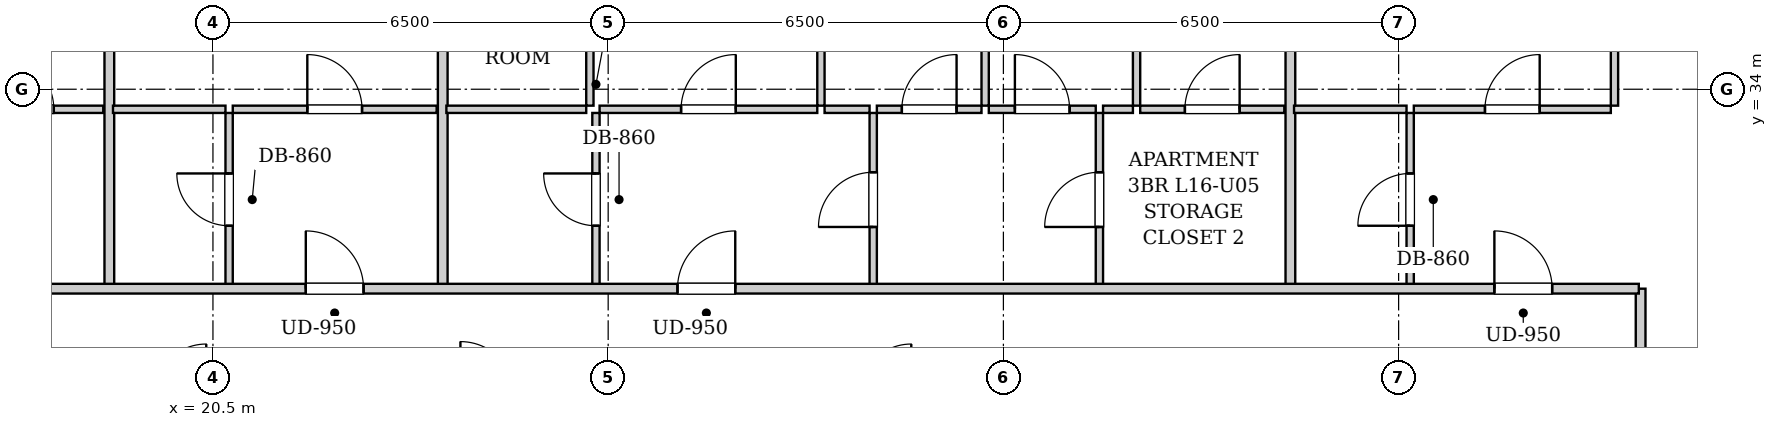
"""IFC4 building model, lengths in metres.
Left out: names, types, materials, properties, quantities, classifications, styles, units other than length and angle.
Written with IfcOpenShell. Run it as: python <this file> out.ifc"""

import sys

from ifc_helpers import new_model, si_unit, direction, frame, frame_2d, origin, place, context, subcontext, project, spatial, rectangle, extrude, element, fill, save


model = new_model("IFC4")
c1 = context("Model", 3, precision=1e-05, world=origin(), true_north=direction((0.0, 1.0)))
c2 = subcontext(c1, "Body", "Model", "MODEL_VIEW")
j1 = project(units=[si_unit("LENGTHUNIT", "METRE"), si_unit("PLANEANGLEUNIT", "RADIAN")], contexts=[c1])
p1 = place(None, origin())
s1 = spatial("IfcSite", under=j1, at=p1, CompositionType="ELEMENT")
p2 = place(p1, origin())
s2 = spatial("IfcBuilding", under=s1, at=p2, CompositionType="ELEMENT")
p3 = place(p2, frame((0.0, 0.0, 61.0)))
s3 = spatial("IfcBuildingStorey", under=s2, at=p3, CompositionType="ELEMENT", Elevation=61.0)
p4 = place(p3, frame((43.98, 28.98, 0.0), z_axis=(0.0, 0.0, 1.0), x_axis=(0.0, 1.0, 0.0)))
e1 = element("IfcWall", 1, at=p4, inside=s3, PredefinedType="PARTITIONING", context=c2, shape_type="SweptSolid", body=[
    extrude(rectangle(XDim=1.74, YDim=0.16, at=frame_2d((0.87, 0.0))), origin(), (0.0, 0.0, 1.0), 2.94),
])
p5 = place(p3, frame((16.17, 33.67, 0.0), z_axis=(0.0, 0.0, 1.0), x_axis=(1.0, 0.0, 0.0)))
e2 = element("IfcWall", 2, at=p5, inside=s3, PredefinedType="PARTITIONING", context=c2, shape_type="SweptSolid", body=[
    extrude(rectangle(XDim=2.526, YDim=0.12, at=frame_2d((1.263, 0.0))), origin(), (0.0, 0.0, 1.0), 2.94),
])
p6 = place(p5, frame((0.813, 0.0, 0.0)))
e3 = element("IfcOpeningElement", 3, at=p6, cuts=e2, PredefinedType="OPENING", context=c2, shape_type="SweptSolid", body=[
    extrude(rectangle(XDim=0.9, YDim=2.05, at=frame_2d((0.45, 1.025))), frame((0.0, 0.07, 0.0), z_axis=(0.0, -1.0, 0.0), x_axis=(1.0, 0.0, 0.0)), (0.0, 0.0, 1.0), 0.14),
])
p7 = place(p3, frame((18.796, 30.76, 0.0), z_axis=(0.0, 0.0, 1.0), x_axis=(0.0, 1.0, 0.0)))
e4 = element("IfcWall", 4, at=p7, inside=s3, PredefinedType="PARTITIONING", context=c2, shape_type="SweptSolid", body=[
    extrude(rectangle(XDim=16.56, YDim=0.16, at=frame_2d((8.28, 0.0))), origin(), (0.0, 0.0, 1.0), 2.94),
])
p8 = place(p3, frame((20.766, 30.76, 0.0), z_axis=(0.0, 0.0, 1.0), x_axis=(0.0, 1.0, 0.0)))
e5 = element("IfcWall", 5, at=p8, inside=s3, PredefinedType="PARTITIONING", context=c2, shape_type="SweptSolid", body=[
    extrude(rectangle(XDim=2.85, YDim=0.12, at=frame_2d((1.425, 0.0))), origin(), (0.0, 0.0, 1.0), 2.94),
])
p9 = place(p8, frame((0.995, 0.0, 0.0)))
e6 = element("IfcOpeningElement", 6, at=p9, cuts=e5, PredefinedType="OPENING", context=c2, shape_type="SweptSolid", body=[
    extrude(rectangle(XDim=0.86, YDim=2.05, at=frame_2d((0.43, 1.025))), frame((0.0, 0.07, 0.0), z_axis=(0.0, -1.0, 0.0), x_axis=(1.0, 0.0, 0.0)), (0.0, 0.0, 1.0), 0.14),
])
p10 = place(p3, frame((18.856, 33.67, 0.0), z_axis=(0.0, 0.0, 1.0), x_axis=(1.0, 0.0, 0.0)))
e7 = element("IfcWall", 7, at=p10, inside=s3, PredefinedType="PARTITIONING", context=c2, shape_type="SweptSolid", body=[
    extrude(rectangle(XDim=1.85, YDim=0.12, at=frame_2d((0.925, 0.0))), origin(), (0.0, 0.0, 1.0), 2.94),
])
p11 = place(p3, frame((20.826, 33.67, 0.0), z_axis=(0.0, 0.0, 1.0), x_axis=(1.0, 0.0, 0.0)))
e8 = element("IfcWall", 8, at=p11, inside=s3, PredefinedType="PARTITIONING", context=c2, shape_type="SweptSolid", body=[
    extrude(rectangle(XDim=3.353, YDim=0.12, at=frame_2d((1.677, 0.0))), origin(), (0.0, 0.0, 1.0), 2.94),
])
p12 = place(p11, frame((1.226, 0.0, 0.0)))
e9 = element("IfcOpeningElement", 9, at=p12, cuts=e8, PredefinedType="OPENING", context=c2, shape_type="SweptSolid", body=[
    extrude(rectangle(XDim=0.9, YDim=2.05, at=frame_2d((0.45, 1.025))), frame((0.0, 0.07, 0.0), z_axis=(0.0, -1.0, 0.0), x_axis=(1.0, 0.0, 0.0)), (0.0, 0.0, 1.0), 0.14),
])
p13 = place(p3, frame((24.279, 30.76, 0.0), z_axis=(0.0, 0.0, 1.0), x_axis=(0.0, 1.0, 0.0)))
e10 = element("IfcWall", 10, at=p13, inside=s3, PredefinedType="PARTITIONING", context=c2, shape_type="SweptSolid", body=[
    extrude(rectangle(XDim=16.56, YDim=0.16, at=frame_2d((8.28, 0.0))), origin(), (0.0, 0.0, 1.0), 2.94),
])
p14 = place(p3, frame((26.799, 30.76, 0.0), z_axis=(0.0, 0.0, 1.0), x_axis=(0.0, 1.0, 0.0)))
e11 = element("IfcWall", 11, at=p14, inside=s3, PredefinedType="PARTITIONING", context=c2, shape_type="SweptSolid", body=[
    extrude(rectangle(XDim=2.85, YDim=0.12, at=frame_2d((1.425, 0.0))), origin(), (0.0, 0.0, 1.0), 2.94),
])
p15 = place(p14, frame((0.995, 0.0, 0.0)))
e12 = element("IfcOpeningElement", 12, at=p15, cuts=e11, PredefinedType="OPENING", context=c2, shape_type="SweptSolid", body=[
    extrude(rectangle(XDim=0.86, YDim=2.05, at=frame_2d((0.43, 1.025))), frame((0.0, 0.07, 0.0), z_axis=(0.0, -1.0, 0.0), x_axis=(1.0, 0.0, 0.0)), (0.0, 0.0, 1.0), 0.14),
])
p16 = place(p3, frame((24.339, 33.67, 0.0), z_axis=(0.0, 0.0, 1.0), x_axis=(1.0, 0.0, 0.0)))
e13 = element("IfcWall", 13, at=p16, inside=s3, PredefinedType="PARTITIONING", context=c2, shape_type="SweptSolid", body=[
    extrude(rectangle(XDim=2.3, YDim=0.12, at=frame_2d((1.15, 0.0))), origin(), (0.0, 0.0, 1.0), 2.94),
])
p17 = place(p3, frame((31.359, 30.76, 0.0), z_axis=(0.0, 0.0, 1.0), x_axis=(0.0, 1.0, 0.0)))
e14 = element("IfcWall", 14, at=p17, inside=s3, PredefinedType="PARTITIONING", context=c2, shape_type="SweptSolid", body=[
    extrude(rectangle(XDim=2.85, YDim=0.12, at=frame_2d((1.425, 0.0))), origin(), (0.0, 0.0, 1.0), 2.94),
])
p18 = place(p17, frame((0.975, 0.0, 0.0)))
e15 = element("IfcOpeningElement", 15, at=p18, cuts=e14, PredefinedType="OPENING", context=c2, shape_type="SweptSolid", body=[
    extrude(rectangle(XDim=0.9, YDim=2.05, at=frame_2d((0.45, 1.025))), frame((0.0, 0.07, 0.0), z_axis=(0.0, -1.0, 0.0), x_axis=(1.0, 0.0, 0.0)), (0.0, 0.0, 1.0), 0.14),
])
p19 = place(p3, frame((26.859, 33.67, 0.0), z_axis=(0.0, 0.0, 1.0), x_axis=(1.0, 0.0, 0.0)))
e16 = element("IfcWall", 16, at=p19, inside=s3, PredefinedType="PARTITIONING", context=c2, shape_type="SweptSolid", body=[
    extrude(rectangle(XDim=3.58, YDim=0.12, at=frame_2d((1.79, 0.0))), origin(), (0.0, 0.0, 1.0), 2.94),
])
p20 = place(p19, frame((1.34, 0.0, 0.0)))
e17 = element("IfcOpeningElement", 17, at=p20, cuts=e16, PredefinedType="OPENING", context=c2, shape_type="SweptSolid", body=[
    extrude(rectangle(XDim=0.9, YDim=2.05, at=frame_2d((0.45, 1.025))), frame((0.0, 0.07, 0.0), z_axis=(0.0, -1.0, 0.0), x_axis=(1.0, 0.0, 0.0)), (0.0, 0.0, 1.0), 0.14),
])
p21 = place(p3, frame((30.559, 33.67, 0.0), z_axis=(0.0, 0.0, 1.0), x_axis=(1.0, 0.0, 0.0)))
e18 = element("IfcWall", 18, at=p21, inside=s3, PredefinedType="PARTITIONING", context=c2, shape_type="SweptSolid", body=[
    extrude(rectangle(XDim=0.74, YDim=0.12, at=frame_2d((0.37, 0.0))), origin(), (0.0, 0.0, 1.0), 2.94),
])
p22 = place(p3, frame((35.079, 30.76, 0.0), z_axis=(0.0, 0.0, 1.0), x_axis=(0.0, 1.0, 0.0)))
e19 = element("IfcWall", 19, at=p22, inside=s3, PredefinedType="PARTITIONING", context=c2, shape_type="SweptSolid", body=[
    extrude(rectangle(XDim=2.85, YDim=0.12, at=frame_2d((1.425, 0.0))), origin(), (0.0, 0.0, 1.0), 2.94),
])
p23 = place(p22, frame((0.975, 0.0, 0.0)))
e20 = element("IfcOpeningElement", 20, at=p23, cuts=e19, PredefinedType="OPENING", context=c2, shape_type="SweptSolid", body=[
    extrude(rectangle(XDim=0.9, YDim=2.05, at=frame_2d((0.45, 1.025))), frame((0.0, 0.07, 0.0), z_axis=(0.0, -1.0, 0.0), x_axis=(1.0, 0.0, 0.0)), (0.0, 0.0, 1.0), 0.14),
])
p24 = place(p3, frame((31.419, 33.67, 0.0), z_axis=(0.0, 0.0, 1.0), x_axis=(1.0, 0.0, 0.0)))
e21 = element("IfcWall", 21, at=p24, inside=s3, PredefinedType="PARTITIONING", context=c2, shape_type="SweptSolid", body=[
    extrude(rectangle(XDim=1.721, YDim=0.12, at=frame_2d((0.86, 0.0))), origin(), (0.0, 0.0, 1.0), 2.94),
])
p25 = place(p24, frame((0.411, 0.0, 0.0)))
e22 = element("IfcOpeningElement", 22, at=p25, cuts=e21, PredefinedType="OPENING", context=c2, shape_type="SweptSolid", body=[
    extrude(rectangle(XDim=0.9, YDim=2.05, at=frame_2d((0.45, 1.025))), frame((0.0, 0.07, 0.0), z_axis=(0.0, -1.0, 0.0), x_axis=(1.0, 0.0, 0.0)), (0.0, 0.0, 1.0), 0.14),
])
p26 = place(p3, frame((33.26, 33.67, 0.0), z_axis=(0.0, 0.0, 1.0), x_axis=(1.0, 0.0, 0.0)))
e23 = element("IfcWall", 23, at=p26, inside=s3, PredefinedType="PARTITIONING", context=c2, shape_type="SweptSolid", body=[
    extrude(rectangle(XDim=1.759, YDim=0.12, at=frame_2d((0.879, 0.0))), origin(), (0.0, 0.0, 1.0), 2.94),
])
p27 = place(p26, frame((0.429, 0.0, 0.0)))
e24 = element("IfcOpeningElement", 24, at=p27, cuts=e23, PredefinedType="OPENING", context=c2, shape_type="SweptSolid", body=[
    extrude(rectangle(XDim=0.9, YDim=2.05, at=frame_2d((0.45, 1.025))), frame((0.0, 0.07, 0.0), z_axis=(0.0, -1.0, 0.0), x_axis=(1.0, 0.0, 0.0)), (0.0, 0.0, 1.0), 0.14),
])
p28 = place(p3, frame((35.139, 33.67, 0.0), z_axis=(0.0, 0.0, 1.0), x_axis=(1.0, 0.0, 0.0)))
e25 = element("IfcWall", 25, at=p28, inside=s3, PredefinedType="PARTITIONING", context=c2, shape_type="SweptSolid", body=[
    extrude(rectangle(XDim=0.491, YDim=0.12, at=frame_2d((0.246, 0.0))), origin(), (0.0, 0.0, 1.0), 2.94),
])
p29 = place(p3, frame((35.75, 33.67, 0.0), z_axis=(0.0, 0.0, 1.0), x_axis=(1.0, 0.0, 0.0)))
e26 = element("IfcWall", 26, at=p29, inside=s3, PredefinedType="PARTITIONING", context=c2, shape_type="SweptSolid", body=[
    extrude(rectangle(XDim=2.37, YDim=0.12, at=frame_2d((1.185, 0.0))), origin(), (0.0, 0.0, 1.0), 2.94),
])
p30 = place(p29, frame((0.735, 0.0, 0.0)))
e27 = element("IfcOpeningElement", 27, at=p30, cuts=e26, PredefinedType="OPENING", context=c2, shape_type="SweptSolid", body=[
    extrude(rectangle(XDim=0.9, YDim=2.05, at=frame_2d((0.45, 1.025))), frame((0.0, 0.07, 0.0), z_axis=(0.0, -1.0, 0.0), x_axis=(1.0, 0.0, 0.0)), (0.0, 0.0, 1.0), 0.14),
])
p31 = place(p3, frame((26.699, 33.73, 0.0), z_axis=(0.0, 0.0, 1.0), x_axis=(0.0, 1.0, 0.0)))
e28 = element("IfcWall", 28, at=p31, inside=s3, PredefinedType="PARTITIONING", context=c2, shape_type="SweptSolid", body=[
    extrude(rectangle(XDim=13.59, YDim=0.12, at=frame_2d((6.795, 0.0))), origin(), (0.0, 0.0, 1.0), 2.94),
])
p32 = place(p31, frame((6.33, 0.0, 0.0)))
e29 = element("IfcOpeningElement", 29, at=p32, cuts=e28, PredefinedType="OPENING", context=c2, shape_type="SweptSolid", body=[
    extrude(rectangle(XDim=0.9, YDim=2.05, at=frame_2d((0.45, 1.025))), frame((0.0, 0.07, 0.0), z_axis=(0.0, -1.0, 0.0), x_axis=(1.0, 0.0, 0.0)), (0.0, 0.0, 1.0), 0.14),
])
p33 = place(p3, frame((30.499, 33.73, 0.0), z_axis=(0.0, 0.0, 1.0), x_axis=(0.0, 1.0, 0.0)))
e30 = element("IfcWall", 30, at=p33, inside=s3, PredefinedType="PARTITIONING", context=c2, shape_type="SweptSolid", body=[
    extrude(rectangle(XDim=13.59, YDim=0.12, at=frame_2d((6.795, 0.0))), origin(), (0.0, 0.0, 1.0), 2.94),
])
p34 = place(p33, frame((6.33, 0.0, 0.0)))
e31 = element("IfcOpeningElement", 31, at=p34, cuts=e30, PredefinedType="OPENING", context=c2, shape_type="SweptSolid", body=[
    extrude(rectangle(XDim=0.9, YDim=2.05, at=frame_2d((0.45, 1.025))), frame((0.0, 0.07, 0.0), z_axis=(0.0, -1.0, 0.0), x_axis=(1.0, 0.0, 0.0)), (0.0, 0.0, 1.0), 0.14),
])
p35 = place(p3, frame((33.2, 33.73, 0.0), z_axis=(0.0, 0.0, 1.0), x_axis=(0.0, 1.0, 0.0)))
e32 = element("IfcWall", 32, at=p35, inside=s3, PredefinedType="PARTITIONING", context=c2, shape_type="SweptSolid", body=[
    extrude(rectangle(XDim=13.59, YDim=0.12, at=frame_2d((6.795, 0.0))), origin(), (0.0, 0.0, 1.0), 2.232),
])
p36 = place(p35, frame((6.33, 0.0, 0.0)))
e33 = element("IfcOpeningElement", 33, at=p36, cuts=e32, PredefinedType="OPENING", context=c2, shape_type="SweptSolid", body=[
    extrude(rectangle(XDim=0.9, YDim=2.05, at=frame_2d((0.45, 1.025))), frame((0.0, 0.07, 0.0), z_axis=(0.0, -1.0, 0.0), x_axis=(1.0, 0.0, 0.0)), (0.0, 0.0, 1.0), 0.14),
])
p37 = place(p3, frame((35.69, 33.73, 0.0), z_axis=(0.0, 0.0, 1.0), x_axis=(0.0, 1.0, 0.0)))
e34 = element("IfcWall", 34, at=p37, inside=s3, PredefinedType="PARTITIONING", context=c2, shape_type="SweptSolid", body=[
    extrude(rectangle(XDim=13.59, YDim=0.12, at=frame_2d((6.795, 0.0))), origin(), (0.0, 0.0, 1.0), 2.94),
])
p38 = place(p37, frame((6.33, 0.0, 0.0)))
e35 = element("IfcOpeningElement", 35, at=p38, cuts=e34, PredefinedType="OPENING", context=c2, shape_type="SweptSolid", body=[
    extrude(rectangle(XDim=0.9, YDim=2.05, at=frame_2d((0.45, 1.025))), frame((0.0, 0.07, 0.0), z_axis=(0.0, -1.0, 0.0), x_axis=(1.0, 0.0, 0.0)), (0.0, 0.0, 1.0), 0.14),
])
p39 = place(p3, frame((38.22, 30.76, 0.0), z_axis=(0.0, 0.0, 1.0), x_axis=(0.0, 1.0, 0.0)))
e36 = element("IfcWall", 36, at=p39, inside=s3, PredefinedType="PARTITIONING", context=c2, shape_type="SweptSolid", body=[
    extrude(rectangle(XDim=14.58, YDim=0.16, at=frame_2d((7.29, 0.0))), origin(), (0.0, 0.0, 1.0), 2.94),
])
p40 = place(p3, frame((40.19, 30.76, 0.0), z_axis=(0.0, 0.0, 1.0), x_axis=(0.0, 1.0, 0.0)))
e37 = element("IfcWall", 37, at=p40, inside=s3, PredefinedType="PARTITIONING", context=c2, shape_type="SweptSolid", body=[
    extrude(rectangle(XDim=2.85, YDim=0.12, at=frame_2d((1.425, 0.0))), origin(), (0.0, 0.0, 1.0), 2.94),
])
p41 = place(p40, frame((0.995, 0.0, 0.0)))
e38 = element("IfcOpeningElement", 38, at=p41, cuts=e37, PredefinedType="OPENING", context=c2, shape_type="SweptSolid", body=[
    extrude(rectangle(XDim=0.86, YDim=2.05, at=frame_2d((0.43, 1.025))), frame((0.0, 0.07, 0.0), z_axis=(0.0, -1.0, 0.0), x_axis=(1.0, 0.0, 0.0)), (0.0, 0.0, 1.0), 0.14),
])
p42 = place(p3, frame((38.28, 33.67, 0.0), z_axis=(0.0, 0.0, 1.0), x_axis=(1.0, 0.0, 0.0)))
e39 = element("IfcWall", 39, at=p42, inside=s3, PredefinedType="PARTITIONING", context=c2, shape_type="SweptSolid", body=[
    extrude(rectangle(XDim=1.85, YDim=0.12, at=frame_2d((0.925, 0.0))), origin(), (0.0, 0.0, 1.0), 2.94),
])
p43 = place(p3, frame((40.25, 33.67, 0.0), z_axis=(0.0, 0.0, 1.0), x_axis=(1.0, 0.0, 0.0)))
e40 = element("IfcWall", 40, at=p43, inside=s3, PredefinedType="PARTITIONING", context=c2, shape_type="SweptSolid", body=[
    extrude(rectangle(XDim=3.24, YDim=0.12, at=frame_2d((1.62, 0.0))), origin(), (0.0, 0.0, 1.0), 2.94),
])
p44 = place(p43, frame((1.17, 0.0, 0.0)))
e41 = element("IfcOpeningElement", 41, at=p44, cuts=e40, PredefinedType="OPENING", context=c2, shape_type="SweptSolid", body=[
    extrude(rectangle(XDim=0.9, YDim=2.05, at=frame_2d((0.45, 1.025))), frame((0.0, 0.07, 0.0), z_axis=(0.0, -1.0, 0.0), x_axis=(1.0, 0.0, 0.0)), (0.0, 0.0, 1.0), 0.14),
])
p45 = place(p3, frame((43.55, 33.73, 0.0), z_axis=(0.0, 0.0, 1.0), x_axis=(0.0, 1.0, 0.0)))
e42 = element("IfcWall", 42, at=p45, inside=s3, PredefinedType="PARTITIONING", context=c2, shape_type="SweptSolid", body=[
    extrude(rectangle(XDim=13.59, YDim=0.12, at=frame_2d((6.795, 0.0))), origin(), (0.0, 0.0, 1.0), 2.94),
])
p46 = place(p45, frame((6.33, 0.0, 0.0)))
e43 = element("IfcOpeningElement", 43, at=p46, cuts=e42, PredefinedType="OPENING", context=c2, shape_type="SweptSolid", body=[
    extrude(rectangle(XDim=0.9, YDim=2.05, at=frame_2d((0.45, 1.025))), frame((0.0, 0.07, 0.0), z_axis=(0.0, -1.0, 0.0), x_axis=(1.0, 0.0, 0.0)), (0.0, 0.0, 1.0), 0.14),
])
p47 = place(p3, frame((10.05, 30.72, 0.0), z_axis=(0.0, 0.0, 1.0), x_axis=(1.0, 0.0, 0.0)))
e44 = element("IfcWall", 44, at=p47, inside=s3, PredefinedType="PARTITIONING", context=c2, shape_type="SweptSolid", body=[
    extrude(rectangle(XDim=33.9, YDim=0.16, at=frame_2d((16.95, 0.0))), origin(), (0.0, 0.0, 1.0), 2.94),
])
p48 = place(p47, frame((3.8, 0.0, 0.0)))
e45 = element("IfcOpeningElement", 45, at=p48, cuts=e44, PredefinedType="OPENING", context=c2, shape_type="SweptSolid", body=[
    extrude(rectangle(XDim=0.95, YDim=2.1, at=frame_2d((0.475, 1.05))), frame((0.0, 0.09, 0.0), z_axis=(0.0, -1.0, 0.0), x_axis=(1.0, 0.0, 0.0)), (0.0, 0.0, 1.0), 0.18),
])
p49 = place(p47, frame((11.977, 0.0, 0.0)))
e46 = element("IfcOpeningElement", 46, at=p49, cuts=e44, PredefinedType="OPENING", context=c2, shape_type="SweptSolid", body=[
    extrude(rectangle(XDim=0.95, YDim=2.1, at=frame_2d((0.475, 1.05))), frame((0.0, 0.09, 0.0), z_axis=(0.0, -1.0, 0.0), x_axis=(1.0, 0.0, 0.0)), (0.0, 0.0, 1.0), 0.18),
])
p50 = place(p47, frame((18.09, 0.0, 0.0)))
e47 = element("IfcOpeningElement", 47, at=p50, cuts=e44, PredefinedType="OPENING", context=c2, shape_type="SweptSolid", body=[
    extrude(rectangle(XDim=0.95, YDim=2.1, at=frame_2d((0.475, 1.05))), frame((0.0, 0.09, 0.0), z_axis=(0.0, -1.0, 0.0), x_axis=(1.0, 0.0, 0.0)), (0.0, 0.0, 1.0), 0.18),
])
p51 = place(p47, frame((31.525, 0.0, 0.0)))
e48 = element("IfcOpeningElement", 48, at=p51, cuts=e44, PredefinedType="OPENING", context=c2, shape_type="SweptSolid", body=[
    extrude(rectangle(XDim=0.95, YDim=2.1, at=frame_2d((0.475, 1.05))), frame((0.0, 0.09, 0.0), z_axis=(0.0, -1.0, 0.0), x_axis=(1.0, 0.0, 0.0)), (0.0, 0.0, 1.0), 0.18),
])
p52 = place(p6, origin())
e49 = element("IfcDoor", 49, at=p52, inside=s3, OperationType="SINGLE_SWING_LEFT", PredefinedType="DOOR", context=c2, shape_type="SweptSolid", body=[
    extrude(rectangle(XDim=0.9, YDim=2.05, at=frame_2d((0.45, 1.025))), frame((0.0, 0.025, 0.0), z_axis=(0.0, -1.0, 0.0), x_axis=(1.0, 0.0, 0.0)), (0.0, 0.0, 1.0), 0.05),
])
fill(e3, e49)
p53 = place(p9, origin())
e50 = element("IfcDoor", 50, at=p53, inside=s3, OperationType="SINGLE_SWING_RIGHT", PredefinedType="DOOR", context=c2, shape_type="SweptSolid", body=[
    extrude(rectangle(XDim=0.86, YDim=2.05, at=frame_2d((0.43, 1.025))), frame((0.0, 0.025, 0.0), z_axis=(0.0, -1.0, 0.0), x_axis=(1.0, 0.0, 0.0)), (0.0, 0.0, 1.0), 0.05),
])
fill(e6, e50)
p54 = place(p12, origin())
e51 = element("IfcDoor", 51, at=p54, inside=s3, OperationType="SINGLE_SWING_LEFT", PredefinedType="DOOR", context=c2, shape_type="SweptSolid", body=[
    extrude(rectangle(XDim=0.9, YDim=2.05, at=frame_2d((0.45, 1.025))), frame((0.0, 0.025, 0.0), z_axis=(0.0, -1.0, 0.0), x_axis=(1.0, 0.0, 0.0)), (0.0, 0.0, 1.0), 0.05),
])
fill(e9, e51)
p55 = place(p15, origin())
e52 = element("IfcDoor", 52, at=p55, inside=s3, OperationType="SINGLE_SWING_RIGHT", PredefinedType="DOOR", context=c2, shape_type="SweptSolid", body=[
    extrude(rectangle(XDim=0.86, YDim=2.05, at=frame_2d((0.43, 1.025))), frame((0.0, 0.025, 0.0), z_axis=(0.0, -1.0, 0.0), x_axis=(1.0, 0.0, 0.0)), (0.0, 0.0, 1.0), 0.05),
])
fill(e12, e52)
p56 = place(p18, origin())
e53 = element("IfcDoor", 53, at=p56, inside=s3, OperationType="SINGLE_SWING_LEFT", PredefinedType="DOOR", context=c2, shape_type="SweptSolid", body=[
    extrude(rectangle(XDim=0.9, YDim=2.05, at=frame_2d((0.45, 1.025))), frame((0.0, 0.025, 0.0), z_axis=(0.0, -1.0, 0.0), x_axis=(1.0, 0.0, 0.0)), (0.0, 0.0, 1.0), 0.05),
])
fill(e15, e53)
p57 = place(p20, origin())
e54 = element("IfcDoor", 54, at=p57, inside=s3, OperationType="SINGLE_SWING_RIGHT", PredefinedType="DOOR", context=c2, shape_type="SweptSolid", body=[
    extrude(rectangle(XDim=0.9, YDim=2.05, at=frame_2d((0.45, 1.025))), frame((0.0, 0.025, 0.0), z_axis=(0.0, -1.0, 0.0), x_axis=(1.0, 0.0, 0.0)), (0.0, 0.0, 1.0), 0.05),
])
fill(e17, e54)
p58 = place(p23, origin())
e55 = element("IfcDoor", 55, at=p58, inside=s3, OperationType="SINGLE_SWING_LEFT", PredefinedType="DOOR", context=c2, shape_type="SweptSolid", body=[
    extrude(rectangle(XDim=0.9, YDim=2.05, at=frame_2d((0.45, 1.025))), frame((0.0, 0.025, 0.0), z_axis=(0.0, -1.0, 0.0), x_axis=(1.0, 0.0, 0.0)), (0.0, 0.0, 1.0), 0.05),
])
fill(e20, e55)
p59 = place(p25, origin())
e56 = element("IfcDoor", 56, at=p59, inside=s3, OperationType="SINGLE_SWING_RIGHT", PredefinedType="DOOR", context=c2, shape_type="SweptSolid", body=[
    extrude(rectangle(XDim=0.9, YDim=2.05, at=frame_2d((0.45, 1.025))), frame((0.0, 0.025, 0.0), z_axis=(0.0, -1.0, 0.0), x_axis=(1.0, 0.0, 0.0)), (0.0, 0.0, 1.0), 0.05),
])
fill(e22, e56)
p60 = place(p27, origin())
e57 = element("IfcDoor", 57, at=p60, inside=s3, OperationType="SINGLE_SWING_LEFT", PredefinedType="DOOR", context=c2, shape_type="SweptSolid", body=[
    extrude(rectangle(XDim=0.9, YDim=2.05, at=frame_2d((0.45, 1.025))), frame((0.0, 0.025, 0.0), z_axis=(0.0, -1.0, 0.0), x_axis=(1.0, 0.0, 0.0)), (0.0, 0.0, 1.0), 0.05),
])
fill(e24, e57)
p61 = place(p30, origin())
e58 = element("IfcDoor", 58, at=p61, inside=s3, OperationType="SINGLE_SWING_RIGHT", PredefinedType="DOOR", context=c2, shape_type="SweptSolid", body=[
    extrude(rectangle(XDim=0.9, YDim=2.05, at=frame_2d((0.45, 1.025))), frame((0.0, 0.025, 0.0), z_axis=(0.0, -1.0, 0.0), x_axis=(1.0, 0.0, 0.0)), (0.0, 0.0, 1.0), 0.05),
])
fill(e27, e58)
p62 = place(p41, origin())
e59 = element("IfcDoor", 59, at=p62, inside=s3, OperationType="SINGLE_SWING_LEFT", PredefinedType="DOOR", context=c2, shape_type="SweptSolid", body=[
    extrude(rectangle(XDim=0.86, YDim=2.05, at=frame_2d((0.43, 1.025))), frame((0.0, 0.025, 0.0), z_axis=(0.0, -1.0, 0.0), x_axis=(1.0, 0.0, 0.0)), (0.0, 0.0, 1.0), 0.05),
])
fill(e38, e59)
p63 = place(p44, origin())
e60 = element("IfcDoor", 60, at=p63, inside=s3, OperationType="SINGLE_SWING_RIGHT", PredefinedType="DOOR", context=c2, shape_type="SweptSolid", body=[
    extrude(rectangle(XDim=0.9, YDim=2.05, at=frame_2d((0.45, 1.025))), frame((0.0, 0.025, 0.0), z_axis=(0.0, -1.0, 0.0), x_axis=(1.0, 0.0, 0.0)), (0.0, 0.0, 1.0), 0.05),
])
fill(e41, e60)
p64 = place(p49, origin())
e61 = element("IfcDoor", 61, at=p64, inside=s3, OperationType="SINGLE_SWING_LEFT", PredefinedType="DOOR", context=c2, shape_type="SweptSolid", body=[
    extrude(rectangle(XDim=0.95, YDim=2.1, at=frame_2d((0.475, 1.05))), frame((0.0, 0.025, 0.0), z_axis=(0.0, -1.0, 0.0), x_axis=(1.0, 0.0, 0.0)), (0.0, 0.0, 1.0), 0.05),
])
fill(e46, e61)
p65 = place(p50, origin())
e62 = element("IfcDoor", 62, at=p65, inside=s3, OperationType="SINGLE_SWING_RIGHT", PredefinedType="DOOR", context=c2, shape_type="SweptSolid", body=[
    extrude(rectangle(XDim=0.95, YDim=2.1, at=frame_2d((0.475, 1.05))), frame((0.0, 0.025, 0.0), z_axis=(0.0, -1.0, 0.0), x_axis=(1.0, 0.0, 0.0)), (0.0, 0.0, 1.0), 0.05),
])
fill(e47, e62)
p66 = place(p51, origin())
e63 = element("IfcDoor", 63, at=p66, inside=s3, OperationType="SINGLE_SWING_LEFT", PredefinedType="DOOR", context=c2, shape_type="SweptSolid", body=[
    extrude(rectangle(XDim=0.95, YDim=2.1, at=frame_2d((0.475, 1.05))), frame((0.0, 0.025, 0.0), z_axis=(0.0, -1.0, 0.0), x_axis=(1.0, 0.0, 0.0)), (0.0, 0.0, 1.0), 0.05),
])
fill(e48, e63)
save(model, sys.argv[1])
